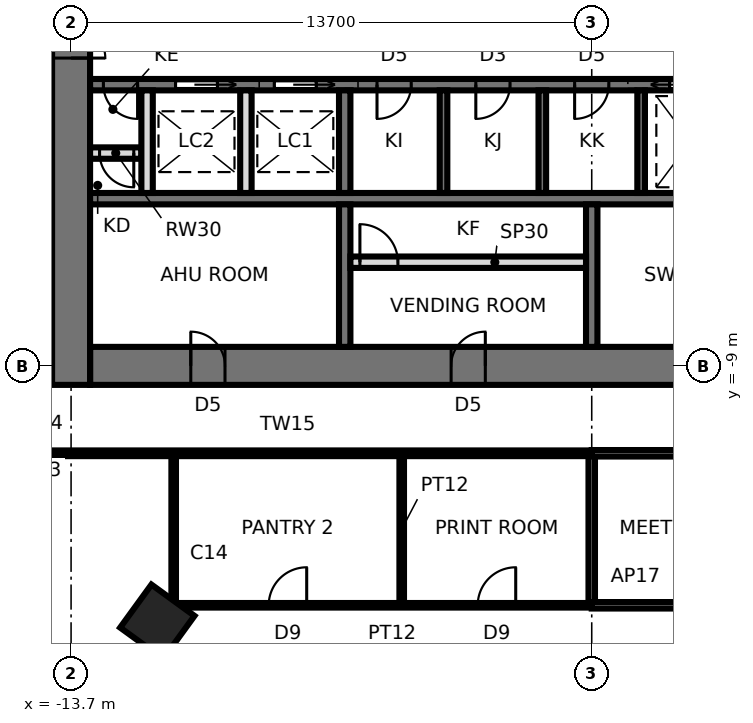
"""IFC4 building model, lengths in metres.
Left out: names, types, materials, properties, quantities, classifications, styles, units other than length and angle.
Written with IfcOpenShell. Run it as: python <this file> out.ifc"""

import sys

from ifc_helpers import new_model, si_unit, direction, frame, frame_2d, origin, origin_2d, place, context, subcontext, project, spatial, rectangle, extrude, element, fill, save


model = new_model("IFC4")
c1 = context("Model", 3, precision=1e-05, world=origin(), true_north=direction((0.0, 1.0)))
c2 = subcontext(c1, "Body", "Model", "MODEL_VIEW")
j1 = project(units=[si_unit("LENGTHUNIT", "METRE"), si_unit("PLANEANGLEUNIT", "RADIAN")], contexts=[c1])
p1 = place(None, origin())
s1 = spatial("IfcSite", under=j1, at=p1, CompositionType="ELEMENT")
p2 = place(p1, origin())
s2 = spatial("IfcBuilding", under=s1, at=p2, CompositionType="ELEMENT")
p3 = place(p2, frame((0.0, 0.0, 195.5)))
s3 = spatial("IfcBuildingStorey", under=s2, at=p3, CompositionType="ELEMENT", Elevation=195.5)
p4 = place(p3, frame((-11.43, -15.733, 0.0), z_axis=(0.0, 0.0, 1.0), x_axis=(-0.587785252292, -0.809016994375, 0.0)))
e1 = element("IfcColumn", 1, at=p4, inside=s3, PredefinedType="COLUMN", context=c2, shape_type="SweptSolid", body=[
    extrude(rectangle(XDim=1.4, YDim=1.4, at=origin_2d()), origin(), (0.0, 0.0, 1.0), 3.9),
])
p5 = place(p3, frame((-13.2, -9.0, 0.0), z_axis=(0.0, 0.0, 1.0), x_axis=(1.0, 0.0, 0.0)))
e2 = element("IfcWall", 2, at=p5, inside=s3, PredefinedType="SHEAR", context=c2, shape_type="SweptSolid", body=[
    extrude(rectangle(XDim=26.4, YDim=1.0, at=frame_2d((13.2, 0.0))), origin(), (0.0, 0.0, 1.0), 3.9),
])
p6 = place(p5, frame((2.65, 0.0, 0.0)))
e3 = element("IfcOpeningElement", 3, at=p6, cuts=e2, PredefinedType="OPENING", context=c2, shape_type="SweptSolid", body=[
    extrude(rectangle(XDim=0.9, YDim=2.1, at=frame_2d((0.45, 1.05))), frame((0.0, 0.51, 0.0), z_axis=(0.0, -1.0, 0.0), x_axis=(1.0, 0.0, 0.0)), (0.0, 0.0, 1.0), 1.02),
])
p7 = place(p5, frame((9.5, 0.0, 0.0)))
e4 = element("IfcOpeningElement", 4, at=p7, cuts=e2, PredefinedType="OPENING", context=c2, shape_type="SweptSolid", body=[
    extrude(rectangle(XDim=0.9, YDim=2.1, at=frame_2d((0.45, 1.05))), frame((0.0, 0.51, 0.0), z_axis=(0.0, -1.0, 0.0), x_axis=(1.0, 0.0, 0.0)), (0.0, 0.0, 1.0), 1.02),
])
p8 = place(p5, frame((16.0, 0.0, 0.0)))
e5 = element("IfcOpeningElement", 5, at=p8, cuts=e2, PredefinedType="OPENING", context=c2, shape_type="SweptSolid", body=[
    extrude(rectangle(XDim=0.9, YDim=2.1, at=frame_2d((0.45, 1.05))), frame((0.0, 0.51, 0.0), z_axis=(0.0, -1.0, 0.0), x_axis=(1.0, 0.0, 0.0)), (0.0, 0.0, 1.0), 1.02),
])
p9 = place(p5, frame((22.85, 0.0, 0.0)))
e6 = element("IfcOpeningElement", 6, at=p9, cuts=e2, PredefinedType="OPENING", context=c2, shape_type="SweptSolid", body=[
    extrude(rectangle(XDim=0.9, YDim=2.1, at=frame_2d((0.45, 1.05))), frame((0.0, 0.51, 0.0), z_axis=(0.0, -1.0, 0.0), x_axis=(1.0, 0.0, 0.0)), (0.0, 0.0, 1.0), 1.02),
])
p10 = place(p3, frame((-13.7, 9.5, 0.0), z_axis=(0.0, 0.0, 1.0), x_axis=(0.0, -1.0, 0.0)))
e7 = element("IfcWall", 7, at=p10, inside=s3, PredefinedType="SHEAR", context=c2, shape_type="SweptSolid", body=[
    extrude(rectangle(XDim=19.0, YDim=1.0, at=frame_2d((9.5, 0.0))), origin(), (0.0, 0.0, 1.0), 3.9),
])
p11 = place(p10, frame((8.6, 0.0, 0.0)))
e8 = element("IfcOpeningElement", 8, at=p11, cuts=e7, PredefinedType="OPENING", context=c2, shape_type="SweptSolid", body=[
    extrude(rectangle(XDim=1.8, YDim=2.4, at=frame_2d((0.9, 1.2))), frame((0.0, 0.51, 0.0), z_axis=(0.0, -1.0, 0.0), x_axis=(1.0, 0.0, 0.0)), (0.0, 0.0, 1.0), 1.02),
])
p12 = place(p3, frame((-13.2, -1.6, 0.0), z_axis=(0.0, 0.0, 1.0), x_axis=(1.0, 0.0, 0.0)))
e9 = element("IfcWall", 9, at=p12, inside=s3, PredefinedType="SHEAR", context=c2, shape_type="SweptSolid", body=[
    extrude(rectangle(XDim=26.4, YDim=0.3, at=frame_2d((13.2, 0.0))), origin(), (0.0, 0.0, 1.0), 3.9),
])
p13 = place(p12, frame((25.15, 0.0, 0.0)))
e10 = element("IfcOpeningElement", 10, at=p13, cuts=e9, PredefinedType="OPENING", context=c2, shape_type="SweptSolid", body=[
    extrude(rectangle(XDim=1.0, YDim=2.1, at=frame_2d((0.5, 1.05))), frame((0.0, 0.16, 0.0), z_axis=(0.0, -1.0, 0.0), x_axis=(1.0, 0.0, 0.0)), (0.0, 0.0, 1.0), 0.32),
])
p14 = place(p12, frame((7.55, 0.0, 0.0)))
e11 = element("IfcOpeningElement", 11, at=p14, cuts=e9, PredefinedType="OPENING", context=c2, shape_type="SweptSolid", body=[
    extrude(rectangle(XDim=0.9, YDim=2.1, at=frame_2d((0.45, 1.05))), frame((0.0, 0.16, 0.0), z_axis=(0.0, -1.0, 0.0), x_axis=(1.0, 0.0, 0.0)), (0.0, 0.0, 1.0), 0.32),
])
p15 = place(p12, frame((10.15, 0.0, 0.0)))
e12 = element("IfcOpeningElement", 12, at=p15, cuts=e9, PredefinedType="OPENING", context=c2, shape_type="SweptSolid", body=[
    extrude(rectangle(XDim=0.9, YDim=2.1, at=frame_2d((0.45, 1.05))), frame((0.0, 0.16, 0.0), z_axis=(0.0, -1.0, 0.0), x_axis=(1.0, 0.0, 0.0)), (0.0, 0.0, 1.0), 0.32),
])
p16 = place(p12, frame((12.75, 0.0, 0.0)))
e13 = element("IfcOpeningElement", 13, at=p16, cuts=e9, PredefinedType="OPENING", context=c2, shape_type="SweptSolid", body=[
    extrude(rectangle(XDim=0.9, YDim=2.1, at=frame_2d((0.45, 1.05))), frame((0.0, 0.16, 0.0), z_axis=(0.0, -1.0, 0.0), x_axis=(1.0, 0.0, 0.0)), (0.0, 0.0, 1.0), 0.32),
])
p17 = place(p12, frame((15.25, 0.0, 0.0)))
e14 = element("IfcOpeningElement", 14, at=p17, cuts=e9, PredefinedType="OPENING", context=c2, shape_type="SweptSolid", body=[
    extrude(rectangle(XDim=1.1, YDim=2.3, at=frame_2d((0.55, 1.15))), frame((0.0, 0.16, 0.0), z_axis=(0.0, -1.0, 0.0), x_axis=(1.0, 0.0, 0.0)), (0.0, 0.0, 1.0), 0.32),
])
p18 = place(p12, frame((17.85, 0.0, 0.0)))
e15 = element("IfcOpeningElement", 15, at=p18, cuts=e9, PredefinedType="OPENING", context=c2, shape_type="SweptSolid", body=[
    extrude(rectangle(XDim=1.1, YDim=2.3, at=frame_2d((0.55, 1.15))), frame((0.0, 0.16, 0.0), z_axis=(0.0, -1.0, 0.0), x_axis=(1.0, 0.0, 0.0)), (0.0, 0.0, 1.0), 0.32),
])
p19 = place(p12, frame((4.85, 0.0, 0.0)))
e16 = element("IfcOpeningElement", 16, at=p19, cuts=e9, PredefinedType="OPENING", context=c2, shape_type="SweptSolid", body=[
    extrude(rectangle(XDim=1.1, YDim=2.3, at=frame_2d((0.55, 1.15))), frame((0.0, 0.16, 0.0), z_axis=(0.0, -1.0, 0.0), x_axis=(1.0, 0.0, 0.0)), (0.0, 0.0, 1.0), 0.32),
])
p20 = place(p12, frame((2.25, 0.0, 0.0)))
e17 = element("IfcOpeningElement", 17, at=p20, cuts=e9, PredefinedType="OPENING", context=c2, shape_type="SweptSolid", body=[
    extrude(rectangle(XDim=1.1, YDim=2.3, at=frame_2d((0.55, 1.15))), frame((0.0, 0.16, 0.0), z_axis=(0.0, -1.0, 0.0), x_axis=(1.0, 0.0, 0.0)), (0.0, 0.0, 1.0), 0.32),
])
p21 = place(p12, frame((0.35, 0.0, 0.0)))
e18 = element("IfcOpeningElement", 18, at=p21, cuts=e9, PredefinedType="OPENING", context=c2, shape_type="SweptSolid", body=[
    extrude(rectangle(XDim=0.9, YDim=2.1, at=frame_2d((0.45, 1.05))), frame((0.0, 0.16, 0.0), z_axis=(0.0, -1.0, 0.0), x_axis=(1.0, 0.0, 0.0)), (0.0, 0.0, 1.0), 0.32),
])
p22 = place(p3, frame((-13.2, -4.6, 0.0), z_axis=(0.0, 0.0, 1.0), x_axis=(1.0, 0.0, 0.0)))
e19 = element("IfcWall", 19, at=p22, inside=s3, PredefinedType="SHEAR", context=c2, shape_type="SweptSolid", body=[
    extrude(rectangle(XDim=26.4, YDim=0.3, at=frame_2d((13.2, 0.0))), origin(), (0.0, 0.0, 1.0), 3.9),
])
p23 = place(p3, frame((-6.5, -1.75, 0.0), z_axis=(0.0, 0.0, 1.0), x_axis=(0.0, -1.0, 0.0)))
e20 = element("IfcWall", 20, at=p23, inside=s3, PredefinedType="SHEAR", context=c2, shape_type="SweptSolid", body=[
    extrude(rectangle(XDim=2.7, YDim=0.3, at=frame_2d((1.35, 0.0))), origin(), (0.0, 0.0, 1.0), 3.9),
])
p24 = place(p3, frame((-6.5, -4.75, 0.0), z_axis=(0.0, 0.0, 1.0), x_axis=(0.0, -1.0, 0.0)))
e21 = element("IfcWall", 21, at=p24, inside=s3, PredefinedType="SHEAR", context=c2, shape_type="SweptSolid", body=[
    extrude(rectangle(XDim=3.75, YDim=0.3, at=frame_2d((1.875, 0.0))), origin(), (0.0, 0.0, 1.0), 3.9),
])
for number, where, z_axis, x_axis in (
    (22, (-3.9, -1.75, 0.0), (0.0, 0.0, 1.0), (0.0, -1.0, 0.0)),
    (23, (-1.3, -1.75, 0.0), (0.0, 0.0, 1.0), (0.0, -1.0, 0.0)),
    (24, (1.3, -1.75, 0.0), (0.0, 0.0, 1.0), (0.0, -1.0, 0.0)),
):
    element("IfcWall", number, at=place(p3, frame(where, z_axis=z_axis, x_axis=x_axis)), inside=s3, PredefinedType="SHEAR", context=c2, shape_type="SweptSolid", body=[
        extrude(rectangle(XDim=2.7, YDim=0.2, at=frame_2d((1.35, 0.0))), origin(), (0.0, 0.0, 1.0), 3.9),
    ])
p25 = place(p3, frame((0.0, -4.75, 0.0), z_axis=(0.0, 0.0, 1.0), x_axis=(0.0, -1.0, 0.0)))
e25 = element("IfcWall", 25, at=p25, inside=s3, PredefinedType="SHEAR", context=c2, shape_type="SweptSolid", body=[
    extrude(rectangle(XDim=3.75, YDim=0.3, at=frame_2d((1.875, 0.0))), origin(), (0.0, 0.0, 1.0), 3.9),
])
p26 = place(p3, frame((-6.35, -6.272, 0.0), z_axis=(0.0, 0.0, 1.0), x_axis=(1.0, 0.0, 0.0)))
e26 = element("IfcWall", 26, at=p26, inside=s3, PredefinedType="PARTITIONING", context=c2, shape_type="SweptSolid", body=[
    extrude(rectangle(XDim=6.2, YDim=0.3, at=frame_2d((3.1, 0.0))), origin(), (0.0, 0.0, 1.0), 3.74),
])
p27 = place(p26, frame((0.25, 0.0, 0.0)))
e27 = element("IfcOpeningElement", 27, at=p27, cuts=e26, PredefinedType="OPENING", context=c2, shape_type="SweptSolid", body=[
    extrude(rectangle(XDim=1.0, YDim=2.4, at=frame_2d((0.5, 1.2))), frame((0.0, 0.16, 0.0), z_axis=(0.0, -1.0, 0.0), x_axis=(1.0, 0.0, 0.0)), (0.0, 0.0, 1.0), 0.32),
])
p28 = place(p3, frame((-13.2, -3.4, 0.0), z_axis=(0.0, 0.0, 1.0), x_axis=(1.0, 0.0, 0.0)))
e28 = element("IfcWall", 28, at=p28, inside=s3, PredefinedType="SOLIDWALL", context=c2, shape_type="SweptSolid", body=[
    extrude(rectangle(XDim=1.35, YDim=0.3, at=frame_2d((0.675, 0.0))), origin(), (0.0, 0.0, 1.0), 3.74),
])
p29 = place(p28, frame((0.25, 0.0, 0.0)))
e29 = element("IfcOpeningElement", 29, at=p29, cuts=e28, PredefinedType="OPENING", context=c2, shape_type="SweptSolid", body=[
    extrude(rectangle(XDim=0.9, YDim=2.1, at=frame_2d((0.45, 1.05))), frame((0.0, 0.16, 0.0), z_axis=(0.0, -1.0, 0.0), x_axis=(1.0, 0.0, 0.0)), (0.0, 0.0, 1.0), 0.32),
])
for number, where, z_axis, x_axis in (
    (30, (-9.1, -1.75, 0.0), (0.0, 0.0, 1.0), (0.0, -1.0, 0.0)),
    (31, (-11.7, -1.75, 0.0), (0.0, 0.0, 1.0), (0.0, -1.0, 0.0)),
):
    element("IfcWall", number, at=place(p3, frame(where, z_axis=z_axis, x_axis=x_axis)), inside=s3, PredefinedType="SOLIDWALL", context=c2, shape_type="SweptSolid", body=[
        extrude(rectangle(XDim=2.7, YDim=0.3, at=frame_2d((1.35, 0.0))), origin(), (0.0, 0.0, 1.0), 3.74),
    ])
p30 = place(p3, frame((-11.0, -11.3, 0.0), z_axis=(0.0, 0.0, 1.0), x_axis=(0.0, -1.0, 0.0)))
e32 = element("IfcWall", 32, at=p30, inside=s3, PredefinedType="PARTITIONING", context=c2, shape_type="SweptSolid", body=[
    extrude(rectangle(XDim=4.0, YDim=0.12, at=frame_2d((2.0, 0.0))), origin(), (0.0, 0.0, 1.0), 3.74),
])
p31 = place(p3, frame((-16.0, -11.3, 0.0), z_axis=(0.0, 0.0, 1.0), x_axis=(1.0, 0.0, 0.0)))
e33 = element("IfcWall", 33, at=p31, inside=s3, PredefinedType="PARTITIONING", context=c2, shape_type="SweptSolid", body=[
    extrude(rectangle(XDim=16.0, YDim=0.15, at=frame_2d((8.0, 0.0))), origin(), (0.0, 0.0, 1.0), 3.74),
])
p32 = place(p3, frame((-5.0, -11.3, 0.0), z_axis=(0.0, 0.0, 1.0), x_axis=(0.0, -1.0, 0.0)))
e34 = element("IfcWall", 34, at=p32, inside=s3, PredefinedType="PARTITIONING", context=c2, shape_type="SweptSolid", body=[
    extrude(rectangle(XDim=4.0, YDim=0.12, at=frame_2d((2.0, 0.0))), origin(), (0.0, 0.0, 1.0), 3.74),
])
p33 = place(p3, frame((-11.0, -15.3, 0.0), z_axis=(0.0, 0.0, 1.0), x_axis=(1.0, 0.0, 0.0)))
e35 = element("IfcWall", 35, at=p33, inside=s3, PredefinedType="PARTITIONING", context=c2, shape_type="SweptSolid", body=[
    extrude(rectangle(XDim=11.0, YDim=0.12, at=frame_2d((5.5, 0.0))), origin(), (0.0, 0.0, 1.0), 3.334),
])
p34 = place(p33, frame((2.5, 0.0, 0.0)))
e36 = element("IfcOpeningElement", 36, at=p34, cuts=e35, PredefinedType="OPENING", context=c2, shape_type="SweptSolid", body=[
    extrude(rectangle(XDim=1.0, YDim=2.4, at=frame_2d((0.5, 1.2))), frame((0.0, 0.07, 0.0), z_axis=(0.0, -1.0, 0.0), x_axis=(1.0, 0.0, 0.0)), (0.0, 0.0, 1.0), 0.14),
])
p35 = place(p33, frame((8.0, 0.0, 0.0)))
e37 = element("IfcOpeningElement", 37, at=p35, cuts=e35, PredefinedType="OPENING", context=c2, shape_type="SweptSolid", body=[
    extrude(rectangle(XDim=1.0, YDim=2.4, at=frame_2d((0.5, 1.2))), frame((0.0, 0.07, 0.0), z_axis=(0.0, -1.0, 0.0), x_axis=(1.0, 0.0, 0.0)), (0.0, 0.0, 1.0), 0.14),
])
p36 = place(p3, frame((0.0, -15.3, 0.0), z_axis=(0.0, 0.0, 1.0), x_axis=(0.0, 1.0, 0.0)))
e38 = element("IfcWall", 38, at=p36, inside=s3, PredefinedType="PARTITIONING", context=c2, shape_type="SweptSolid", body=[
    extrude(rectangle(XDim=4.0, YDim=0.17, at=frame_2d((2.0, 0.0))), origin(), (0.0, 0.0, 1.0), 3.04),
])
p37 = place(p3, frame((0.0, -15.3, 0.0), z_axis=(0.0, 0.0, 1.0), x_axis=(1.0, 0.0, 0.0)))
e39 = element("IfcWall", 39, at=p37, inside=s3, PredefinedType="PARTITIONING", context=c2, shape_type="SweptSolid", body=[
    extrude(rectangle(XDim=6.0, YDim=0.17, at=frame_2d((3.0, 0.0))), origin(), (0.0, 0.0, 1.0), 3.334),
])
p38 = place(p37, frame((2.45, 0.0, 0.0)))
e40 = element("IfcOpeningElement", 40, at=p38, cuts=e39, PredefinedType="OPENING", context=c2, shape_type="SweptSolid", body=[
    extrude(rectangle(XDim=1.1, YDim=2.4, at=frame_2d((0.55, 1.2))), frame((0.0, 0.095, 0.0), z_axis=(0.0, -1.0, 0.0), x_axis=(1.0, 0.0, 0.0)), (0.0, 0.0, 1.0), 0.19),
])
p39 = place(p3, frame((6.0, -11.3, 0.0), z_axis=(0.0, 0.0, 1.0), x_axis=(-1.0, 0.0, 0.0)))
e41 = element("IfcWall", 41, at=p39, inside=s3, PredefinedType="PARTITIONING", context=c2, shape_type="SweptSolid", body=[
    extrude(rectangle(XDim=6.0, YDim=0.17, at=frame_2d((3.0, 0.0))), origin(), (0.0, 0.0, 1.0), 3.74),
])
p40 = place(p11, origin())
e42 = element("IfcDoor", 42, at=p40, inside=s3, OperationType="DOUBLE_DOOR_SINGLE_SWING", PredefinedType="DOOR", context=c2, shape_type="SweptSolid", body=[
    extrude(rectangle(XDim=1.72, YDim=2.36, at=frame_2d((0.9, 1.18))), frame((0.0, 0.025, 0.0), z_axis=(0.0, -1.0, 0.0), x_axis=(1.0, 0.0, 0.0)), (0.0, 0.0, 1.0), 0.05),
    extrude(rectangle(XDim=0.04, YDim=2.4, at=frame_2d((0.02, 1.2))), frame((0.0, 0.25, 0.0), z_axis=(0.0, -1.0, 0.0), x_axis=(1.0, 0.0, 0.0)), (0.0, 0.0, 1.0), 0.5),
    extrude(rectangle(XDim=0.04, YDim=2.4, at=frame_2d((1.78, 1.2))), frame((0.0, 0.25, 0.0), z_axis=(0.0, -1.0, 0.0), x_axis=(1.0, 0.0, 0.0)), (0.0, 0.0, 1.0), 0.5),
    extrude(rectangle(XDim=1.72, YDim=0.04, at=frame_2d((0.9, 2.38))), frame((0.0, 0.25, 0.0), z_axis=(0.0, -1.0, 0.0), x_axis=(1.0, 0.0, 0.0)), (0.0, 0.0, 1.0), 0.5),
])
fill(e8, e42)
p41 = place(p14, frame((0.9, 0.0, 0.0), z_axis=(0.0, 0.0, 1.0), x_axis=(-1.0, 0.0, 0.0)))
e43 = element("IfcDoor", 43, at=p41, inside=s3, OperationType="SINGLE_SWING_RIGHT", PredefinedType="DOOR", context=c2, shape_type="SweptSolid", body=[
    extrude(rectangle(XDim=0.9, YDim=2.1, at=frame_2d((0.45, 1.05))), frame((0.0, 0.025, 0.0), z_axis=(0.0, -1.0, 0.0), x_axis=(1.0, 0.0, 0.0)), (0.0, 0.0, 1.0), 0.05),
])
fill(e11, e43)
p42 = place(p15, frame((0.9, 0.0, 0.0), z_axis=(0.0, 0.0, 1.0), x_axis=(-1.0, 0.0, 0.0)))
e44 = element("IfcDoor", 44, at=p42, inside=s3, OperationType="SINGLE_SWING_RIGHT", PredefinedType="DOOR", context=c2, shape_type="SweptSolid", body=[
    extrude(rectangle(XDim=0.9, YDim=2.1, at=frame_2d((0.45, 1.05))), frame((0.0, 0.025, 0.0), z_axis=(0.0, -1.0, 0.0), x_axis=(1.0, 0.0, 0.0)), (0.0, 0.0, 1.0), 0.05),
])
fill(e12, e44)
p43 = place(p16, frame((0.9, 0.0, 0.0), z_axis=(0.0, 0.0, 1.0), x_axis=(-1.0, 0.0, 0.0)))
e45 = element("IfcDoor", 45, at=p43, inside=s3, OperationType="SINGLE_SWING_RIGHT", PredefinedType="DOOR", context=c2, shape_type="SweptSolid", body=[
    extrude(rectangle(XDim=0.9, YDim=2.1, at=frame_2d((0.45, 1.05))), frame((0.0, 0.025, 0.0), z_axis=(0.0, -1.0, 0.0), x_axis=(1.0, 0.0, 0.0)), (0.0, 0.0, 1.0), 0.05),
])
fill(e13, e45)
p44 = place(p17, frame((1.1, 0.0, 0.0), z_axis=(0.0, 0.0, 1.0), x_axis=(-1.0, 0.0, 0.0)))
e46 = element("IfcDoor", 46, at=p44, inside=s3, OperationType="SLIDING_TO_RIGHT", PredefinedType="DOOR", context=c2, shape_type="SweptSolid", body=[
    extrude(rectangle(XDim=1.1, YDim=2.3, at=frame_2d((0.55, 1.15))), frame((0.0, 0.025, 0.0), z_axis=(0.0, -1.0, 0.0), x_axis=(1.0, 0.0, 0.0)), (0.0, 0.0, 1.0), 0.05),
])
fill(e14, e46)
p45 = place(p19, frame((1.1, 0.0, 0.0), z_axis=(0.0, 0.0, 1.0), x_axis=(-1.0, 0.0, 0.0)))
e47 = element("IfcDoor", 47, at=p45, inside=s3, OperationType="SLIDING_TO_LEFT", PredefinedType="DOOR", context=c2, shape_type="SweptSolid", body=[
    extrude(rectangle(XDim=1.1, YDim=2.3, at=frame_2d((0.55, 1.15))), frame((0.0, 0.025, 0.0), z_axis=(0.0, -1.0, 0.0), x_axis=(1.0, 0.0, 0.0)), (0.0, 0.0, 1.0), 0.05),
])
fill(e16, e47)
p46 = place(p20, frame((1.1, 0.0, 0.0), z_axis=(0.0, 0.0, 1.0), x_axis=(-1.0, 0.0, 0.0)))
e48 = element("IfcDoor", 48, at=p46, inside=s3, OperationType="SLIDING_TO_LEFT", PredefinedType="DOOR", context=c2, shape_type="SweptSolid", body=[
    extrude(rectangle(XDim=1.1, YDim=2.3, at=frame_2d((0.55, 1.15))), frame((0.0, 0.025, 0.0), z_axis=(0.0, -1.0, 0.0), x_axis=(1.0, 0.0, 0.0)), (0.0, 0.0, 1.0), 0.05),
])
fill(e17, e48)
p47 = place(p21, frame((0.9, 0.0, 0.0), z_axis=(0.0, 0.0, 1.0), x_axis=(-1.0, 0.0, 0.0)))
e49 = element("IfcDoor", 49, at=p47, inside=s3, OperationType="SINGLE_SWING_LEFT", PredefinedType="DOOR", context=c2, shape_type="SweptSolid", body=[
    extrude(rectangle(XDim=0.9, YDim=2.1, at=frame_2d((0.45, 1.05))), frame((0.0, 0.025, 0.0), z_axis=(0.0, -1.0, 0.0), x_axis=(1.0, 0.0, 0.0)), (0.0, 0.0, 1.0), 0.05),
])
fill(e18, e49)
p48 = place(p6, origin())
e50 = element("IfcDoor", 50, at=p48, inside=s3, OperationType="SINGLE_SWING_LEFT", PredefinedType="DOOR", context=c2, shape_type="SweptSolid", body=[
    extrude(rectangle(XDim=0.82, YDim=2.06, at=frame_2d((0.45, 1.03))), frame((0.0, 0.025, 0.0), z_axis=(0.0, -1.0, 0.0), x_axis=(1.0, 0.0, 0.0)), (0.0, 0.0, 1.0), 0.05),
    extrude(rectangle(XDim=0.04, YDim=2.1, at=frame_2d((0.02, 1.05))), frame((0.0, 0.25, 0.0), z_axis=(0.0, -1.0, 0.0), x_axis=(1.0, 0.0, 0.0)), (0.0, 0.0, 1.0), 0.5),
    extrude(rectangle(XDim=0.04, YDim=2.1, at=frame_2d((0.88, 1.05))), frame((0.0, 0.25, 0.0), z_axis=(0.0, -1.0, 0.0), x_axis=(1.0, 0.0, 0.0)), (0.0, 0.0, 1.0), 0.5),
    extrude(rectangle(XDim=0.82, YDim=0.04, at=frame_2d((0.45, 2.08))), frame((0.0, 0.25, 0.0), z_axis=(0.0, -1.0, 0.0), x_axis=(1.0, 0.0, 0.0)), (0.0, 0.0, 1.0), 0.5),
])
fill(e3, e50)
p49 = place(p7, origin())
e51 = element("IfcDoor", 51, at=p49, inside=s3, OperationType="SINGLE_SWING_RIGHT", PredefinedType="DOOR", context=c2, shape_type="SweptSolid", body=[
    extrude(rectangle(XDim=0.82, YDim=2.06, at=frame_2d((0.45, 1.03))), frame((0.0, 0.025, 0.0), z_axis=(0.0, -1.0, 0.0), x_axis=(1.0, 0.0, 0.0)), (0.0, 0.0, 1.0), 0.05),
    extrude(rectangle(XDim=0.04, YDim=2.1, at=frame_2d((0.02, 1.05))), frame((0.0, 0.25, 0.0), z_axis=(0.0, -1.0, 0.0), x_axis=(1.0, 0.0, 0.0)), (0.0, 0.0, 1.0), 0.5),
    extrude(rectangle(XDim=0.04, YDim=2.1, at=frame_2d((0.88, 1.05))), frame((0.0, 0.25, 0.0), z_axis=(0.0, -1.0, 0.0), x_axis=(1.0, 0.0, 0.0)), (0.0, 0.0, 1.0), 0.5),
    extrude(rectangle(XDim=0.82, YDim=0.04, at=frame_2d((0.45, 2.08))), frame((0.0, 0.25, 0.0), z_axis=(0.0, -1.0, 0.0), x_axis=(1.0, 0.0, 0.0)), (0.0, 0.0, 1.0), 0.5),
])
fill(e4, e51)
p50 = place(p27, origin())
e52 = element("IfcDoor", 52, at=p50, inside=s3, OperationType="SINGLE_SWING_LEFT", PredefinedType="DOOR", context=c2, shape_type="SweptSolid", body=[
    extrude(rectangle(XDim=1.0, YDim=2.4, at=frame_2d((0.5, 1.2))), frame((0.0, 0.025, 0.0), z_axis=(0.0, -1.0, 0.0), x_axis=(1.0, 0.0, 0.0)), (0.0, 0.0, 1.0), 0.05),
])
fill(e27, e52)
p51 = place(p29, frame((0.9, 0.0, 0.0), z_axis=(0.0, 0.0, 1.0), x_axis=(-1.0, 0.0, 0.0)))
e53 = element("IfcDoor", 53, at=p51, inside=s3, OperationType="SINGLE_SWING_LEFT", PredefinedType="DOOR", context=c2, shape_type="SweptSolid", body=[
    extrude(rectangle(XDim=0.9, YDim=2.1, at=frame_2d((0.45, 1.05))), frame((0.0, 0.025, 0.0), z_axis=(0.0, -1.0, 0.0), x_axis=(1.0, 0.0, 0.0)), (0.0, 0.0, 1.0), 0.05),
])
fill(e29, e53)
p52 = place(p34, origin())
e54 = element("IfcDoor", 54, at=p52, inside=s3, OperationType="SINGLE_SWING_RIGHT", PredefinedType="DOOR", context=c2, shape_type="SweptSolid", body=[
    extrude(rectangle(XDim=1.0, YDim=2.4, at=frame_2d((0.5, 1.2))), frame((0.0, 0.025, 0.0), z_axis=(0.0, -1.0, 0.0), x_axis=(1.0, 0.0, 0.0)), (0.0, 0.0, 1.0), 0.05),
])
fill(e36, e54)
p53 = place(p35, origin())
e55 = element("IfcDoor", 55, at=p53, inside=s3, OperationType="SINGLE_SWING_RIGHT", PredefinedType="DOOR", context=c2, shape_type="SweptSolid", body=[
    extrude(rectangle(XDim=1.0, YDim=2.4, at=frame_2d((0.5, 1.2))), frame((0.0, 0.025, 0.0), z_axis=(0.0, -1.0, 0.0), x_axis=(1.0, 0.0, 0.0)), (0.0, 0.0, 1.0), 0.05),
])
fill(e37, e55)
save(model, sys.argv[1])
